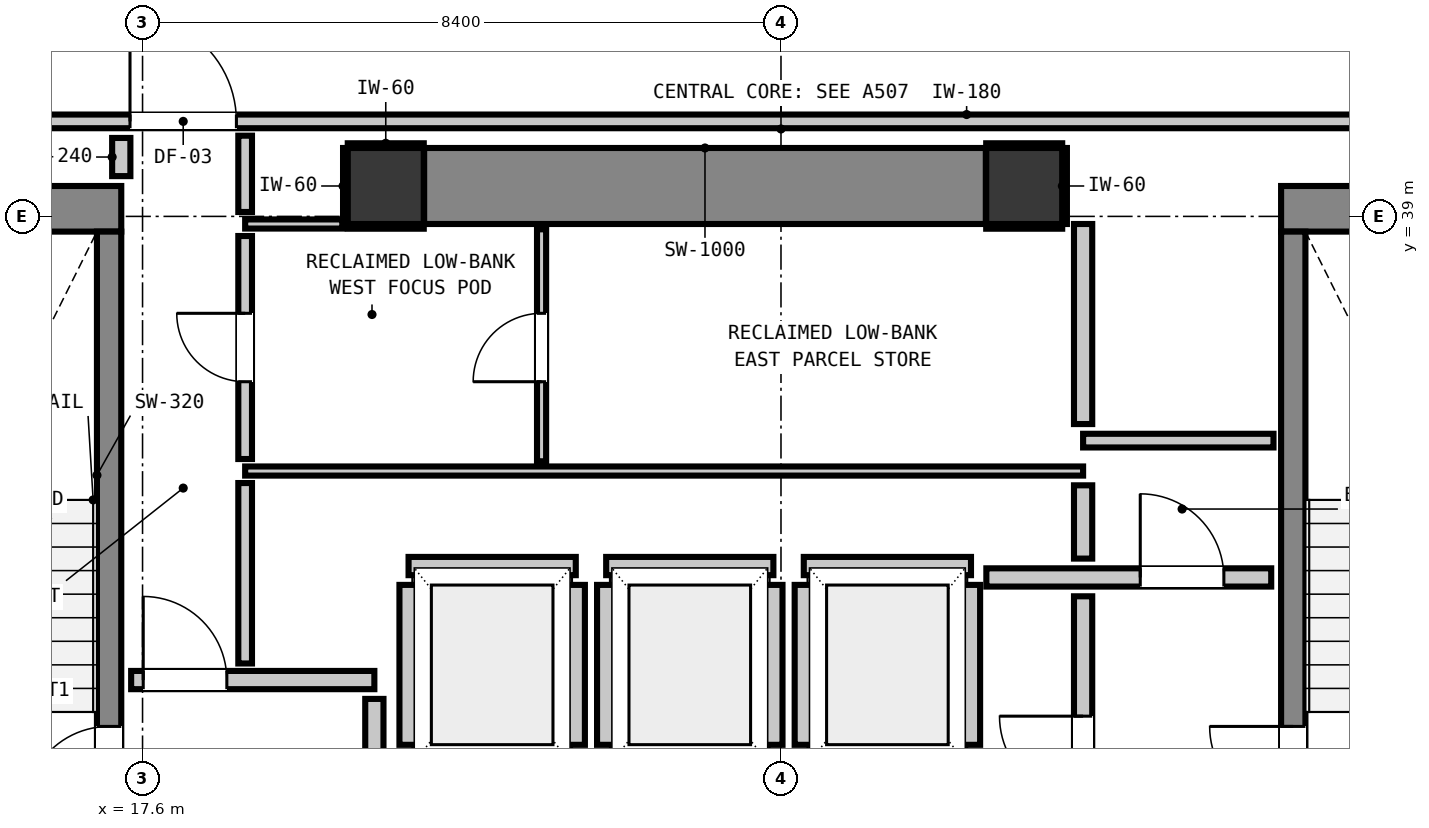
"""IFC4 building model, lengths in metres.
Left out: names, types, materials, properties, quantities, classifications, styles, units other than length and angle.
Written with IfcOpenShell. Run it as: python <this file> out.ifc"""

import sys

from ifc_helpers import new_model, si_unit, direction, frame, frame_2d, origin, origin_2d, place, context, subcontext, project, spatial, rectangle, extrude, element, fill, save


model = new_model("IFC4")
c1 = context("Model", 3, precision=1e-05, world=origin(), true_north=direction((0.0, 1.0)))
c2 = subcontext(c1, "Body", "Model", "MODEL_VIEW")
j1 = project(units=[si_unit("LENGTHUNIT", "METRE"), si_unit("PLANEANGLEUNIT", "RADIAN")], contexts=[c1])
p1 = place(None, origin())
s1 = spatial("IfcSite", under=j1, at=p1, CompositionType="ELEMENT")
p2 = place(p1, origin())
s2 = spatial("IfcBuilding", under=s1, at=p2, CompositionType="ELEMENT")
p3 = place(p2, frame((0.0, 0.0, 169.16)))
s3 = spatial("IfcBuildingStorey", under=s2, at=p3, CompositionType="ELEMENT", Elevation=169.16)
for number, where, z_axis, x_axis in (
    (1, (20.8, 39.4, 0.0), (0.0, 0.0, 1.0), (1.0, 0.0, 0.0)),
    (2, (29.2, 39.4, 0.0), (0.0, 0.0, 1.0), (1.0, 0.0, 0.0)),
):
    element("IfcColumn", number, at=place(p3, frame(where, z_axis=z_axis, x_axis=x_axis)), inside=s3, PredefinedType="COLUMN", context=c2, shape_type="SweptSolid", body=[
        extrude(rectangle(XDim=1.0, YDim=1.0, at=origin_2d()), origin(), (0.0, 0.0, 1.0), 3.32),
    ])
p4 = place(p3, frame((13.24, 39.1, 0.0), z_axis=(0.0, 0.0, 1.0), x_axis=(1.0, 0.0, 0.0)))
e3 = element("IfcWall", 3, at=p4, inside=s3, PredefinedType="SHEAR", context=c2, shape_type="SweptSolid", body=[
    extrude(rectangle(XDim=4.08, YDim=0.6, at=frame_2d((2.04, 0.0))), origin(), (0.0, 0.0, 1.0), 3.32),
])
p5 = place(p3, frame((32.58, 39.1, 0.0), z_axis=(0.0, 0.0, 1.0), x_axis=(1.0, 0.0, 0.0)))
e4 = element("IfcWall", 4, at=p5, inside=s3, PredefinedType="SHEAR", context=c2, shape_type="SweptSolid", body=[
    extrude(rectangle(XDim=4.08, YDim=0.6, at=frame_2d((2.04, 0.0))), origin(), (0.0, 0.0, 1.0), 3.32),
])
p6 = place(p3, frame((21.305, 39.4, 0.0), z_axis=(0.0, 0.0, 1.0), x_axis=(1.0, 0.0, 0.0)))
e5 = element("IfcWall", 5, at=p6, inside=s3, PredefinedType="SHEAR", context=c2, shape_type="SweptSolid", body=[
    extrude(rectangle(XDim=7.39, YDim=1.0, at=frame_2d((3.695, 0.0))), origin(), (0.0, 0.0, 1.0), 3.32),
])
p7 = place(p3, frame((17.16, 31.0, 0.0), z_axis=(0.0, 0.0, 1.0), x_axis=(0.0, 1.0, 0.0)))
e6 = element("IfcWall", 6, at=p7, inside=s3, PredefinedType="SHEAR", context=c2, shape_type="SweptSolid", body=[
    extrude(rectangle(XDim=7.8, YDim=0.32, at=frame_2d((3.9, 0.0))), origin(), (0.0, 0.0, 1.0), 3.32),
])
p8 = place(p7, frame((0.19, 0.0, 0.0)))
e7 = element("IfcOpeningElement", 7, at=p8, cuts=e6, PredefinedType="OPENING", context=c2, shape_type="SweptSolid", body=[
    extrude(rectangle(XDim=1.1, YDim=2.15, at=frame_2d((0.55, 1.075))), frame((0.0, 0.17, 0.0), z_axis=(0.0, -1.0, 0.0), x_axis=(1.0, 0.0, 0.0)), (0.0, 0.0, 1.0), 0.34),
])
p9 = place(p3, frame((32.74, 31.0, 0.0), z_axis=(0.0, 0.0, 1.0), x_axis=(0.0, 1.0, 0.0)))
e8 = element("IfcWall", 8, at=p9, inside=s3, PredefinedType="SHEAR", context=c2, shape_type="SweptSolid", body=[
    extrude(rectangle(XDim=7.8, YDim=0.32, at=frame_2d((3.9, 0.0))), origin(), (0.0, 0.0, 1.0), 3.32),
])
p10 = place(p9, frame((0.19, 0.0, 0.0)))
e9 = element("IfcOpeningElement", 9, at=p10, cuts=e8, PredefinedType="OPENING", context=c2, shape_type="SweptSolid", body=[
    extrude(rectangle(XDim=1.1, YDim=2.15, at=frame_2d((0.55, 1.075))), frame((0.0, 0.17, 0.0), z_axis=(0.0, -1.0, 0.0), x_axis=(1.0, 0.0, 0.0)), (0.0, 0.0, 1.0), 0.34),
])
p11 = place(p3, frame((21.1, 34.4, 0.0), z_axis=(0.0, 0.0, 1.0), x_axis=(1.0, 0.0, 0.0)))
e10 = element("IfcWall", 10, at=p11, inside=s3, PredefinedType="PARTITIONING", context=c2, shape_type="SweptSolid", body=[
    extrude(rectangle(XDim=2.2, YDim=0.24, at=frame_2d((1.1, 0.0))), origin(), (0.0, 0.0, 1.0), 2.96),
])
p12 = place(p3, frame((21.1, 32.048, 0.0), z_axis=(0.0, 0.0, 1.0), x_axis=(0.0, 1.0, 0.0)))
e11 = element("IfcWall", 11, at=p12, inside=s3, PredefinedType="PARTITIONING", context=c2, shape_type="SweptSolid", body=[
    extrude(rectangle(XDim=2.104, YDim=0.24, at=frame_2d((1.052, 0.0))), origin(), (0.0, 0.0, 1.0), 2.195),
])
p13 = place(p3, frame((23.3, 32.048, 0.0), z_axis=(0.0, 0.0, 1.0), x_axis=(0.0, 1.0, 0.0)))
e12 = element("IfcWall", 12, at=p13, inside=s3, PredefinedType="PARTITIONING", context=c2, shape_type="SweptSolid", body=[
    extrude(rectangle(XDim=2.104, YDim=0.24, at=frame_2d((1.052, 0.0))), origin(), (0.0, 0.0, 1.0), 2.96),
])
p14 = place(p3, frame((23.7, 34.4, 0.0), z_axis=(0.0, 0.0, 1.0), x_axis=(1.0, 0.0, 0.0)))
e13 = element("IfcWall", 13, at=p14, inside=s3, PredefinedType="PARTITIONING", context=c2, shape_type="SweptSolid", body=[
    extrude(rectangle(XDim=2.2, YDim=0.24, at=frame_2d((1.1, 0.0))), origin(), (0.0, 0.0, 1.0), 2.96),
])
for number, where, z_axis, x_axis in (
    (14, (23.7, 32.048, 0.0), (0.0, 0.0, 1.0), (0.0, 1.0, 0.0)),
    (15, (25.9, 32.048, 0.0), (0.0, 0.0, 1.0), (0.0, 1.0, 0.0)),
):
    element("IfcWall", number, at=place(p3, frame(where, z_axis=z_axis, x_axis=x_axis)), inside=s3, PredefinedType="PARTITIONING", context=c2, shape_type="SweptSolid", body=[
        extrude(rectangle(XDim=2.104, YDim=0.24, at=frame_2d((1.052, 0.0))), origin(), (0.0, 0.0, 1.0), 2.96),
    ])
p15 = place(p3, frame((26.3, 34.4, 0.0), z_axis=(0.0, 0.0, 1.0), x_axis=(1.0, 0.0, 0.0)))
e16 = element("IfcWall", 16, at=p15, inside=s3, PredefinedType="PARTITIONING", context=c2, shape_type="SweptSolid", body=[
    extrude(rectangle(XDim=2.2, YDim=0.24, at=frame_2d((1.1, 0.0))), origin(), (0.0, 0.0, 1.0), 2.96),
])
for number, where, z_axis, x_axis in (
    (17, (26.3, 32.048, 0.0), (0.0, 0.0, 1.0), (0.0, 1.0, 0.0)),
    (18, (28.5, 32.048, 0.0), (0.0, 0.0, 1.0), (0.0, 1.0, 0.0)),
):
    element("IfcWall", number, at=place(p3, frame(where, z_axis=z_axis, x_axis=x_axis)), inside=s3, PredefinedType="PARTITIONING", context=c2, shape_type="SweptSolid", body=[
        extrude(rectangle(XDim=2.104, YDim=0.24, at=frame_2d((1.052, 0.0))), origin(), (0.0, 0.0, 1.0), 2.96),
    ])
p16 = place(p3, frame((17.45, 32.9, 0.0), z_axis=(0.0, 0.0, 1.0), x_axis=(1.0, 0.0, 0.0)))
e19 = element("IfcWall", 19, at=p16, inside=s3, PredefinedType="PARTITIONING", context=c2, shape_type="SweptSolid", body=[
    extrude(rectangle(XDim=3.2, YDim=0.24, at=frame_2d((1.6, 0.0))), origin(), (0.0, 0.0, 1.0), 2.96),
])
p17 = place(p16, frame((0.159, 0.0, 0.0)))
e20 = element("IfcOpeningElement", 20, at=p17, cuts=e19, PredefinedType="OPENING", context=c2, shape_type="SweptSolid", body=[
    extrude(rectangle(XDim=1.1, YDim=2.15, at=frame_2d((0.55, 1.075))), frame((0.0, 0.13, 0.0), z_axis=(0.0, -1.0, 0.0), x_axis=(1.0, 0.0, 0.0)), (0.0, 0.0, 1.0), 0.26),
])
p18 = place(p3, frame((28.702, 34.25, 0.0), z_axis=(0.0, 0.0, 1.0), x_axis=(1.0, 0.0, 0.0)))
e21 = element("IfcWall", 21, at=p18, inside=s3, PredefinedType="PARTITIONING", context=c2, shape_type="SweptSolid", body=[
    extrude(rectangle(XDim=3.748, YDim=0.24, at=frame_2d((1.874, 0.0))), origin(), (0.0, 0.0, 1.0), 2.96),
])
p19 = place(p18, frame((2.025, 0.0, 0.0)))
e22 = element("IfcOpeningElement", 22, at=p19, cuts=e21, PredefinedType="OPENING", context=c2, shape_type="SweptSolid", body=[
    extrude(rectangle(XDim=1.1, YDim=2.15, at=frame_2d((0.55, 1.075))), frame((0.0, 0.13, 0.0), z_axis=(0.0, -1.0, 0.0), x_axis=(1.0, 0.0, 0.0)), (0.0, 0.0, 1.0), 0.26),
])
p20 = place(p3, frame((29.975, 36.05, 0.0), z_axis=(0.0, 0.0, 1.0), x_axis=(1.0, 0.0, 0.0)))
e23 = element("IfcWall", 23, at=p20, inside=s3, PredefinedType="PARTITIONING", context=c2, shape_type="SweptSolid", body=[
    extrude(rectangle(XDim=2.505, YDim=0.18, at=frame_2d((1.252, 0.0))), origin(), (0.0, 0.0, 1.0), 2.96),
])
p21 = place(p3, frame((3.207, 40.25, 0.0), z_axis=(0.0, 0.0, 1.0), x_axis=(1.0, 0.0, 0.0)))
e24 = element("IfcWall", 24, at=p21, inside=s3, PredefinedType="PARTITIONING", context=c2, shape_type="SweptSolid", body=[
    extrude(rectangle(XDim=39.386, YDim=0.18, at=frame_2d((19.693, 0.0))), origin(), (0.0, 0.0, 1.0), 2.96),
])
p22 = place(p21, frame((14.228, 0.0, 0.0)))
e25 = element("IfcOpeningElement", 25, at=p22, cuts=e24, PredefinedType="OPENING", context=c2, shape_type="SweptSolid", body=[
    extrude(rectangle(XDim=1.4, YDim=2.15, at=frame_2d((0.7, 1.075))), frame((0.0, 0.1, 0.0), z_axis=(0.0, -1.0, 0.0), x_axis=(1.0, 0.0, 0.0)), (0.0, 0.0, 1.0), 0.2),
])
p23 = place(p21, frame((7.243, 0.0, 0.0)))
e26 = element("IfcOpeningElement", 26, at=p23, cuts=e24, PredefinedType="OPENING", context=c2, shape_type="SweptSolid", body=[
    extrude(rectangle(XDim=1.4, YDim=2.15, at=frame_2d((0.7, 1.075))), frame((0.0, 0.1, 0.0), z_axis=(0.0, -1.0, 0.0), x_axis=(1.0, 0.0, 0.0)), (0.0, 0.0, 1.0), 0.2),
])
p24 = place(p21, frame((34.843, 0.0, 0.0)))
e27 = element("IfcOpeningElement", 27, at=p24, cuts=e24, PredefinedType="OPENING", context=c2, shape_type="SweptSolid", body=[
    extrude(rectangle(XDim=1.4, YDim=2.15, at=frame_2d((0.7, 1.075))), frame((0.0, 0.1, 0.0), z_axis=(0.0, -1.0, 0.0), x_axis=(1.0, 0.0, 0.0)), (0.0, 0.0, 1.0), 0.2),
])
p25 = place(p3, frame((18.95, 35.65, 0.0), z_axis=(0.0, 0.0, 1.0), x_axis=(1.0, 0.0, 0.0)))
e28 = element("IfcWall", 28, at=p25, inside=s3, PredefinedType="PARTITIONING", context=c2, shape_type="SweptSolid", body=[
    extrude(rectangle(XDim=11.025, YDim=0.12, at=frame_2d((5.513, 0.0))), origin(), (0.0, 0.0, 1.0), 2.96),
])
p26 = place(p3, frame((18.95, 38.9, 0.0), z_axis=(0.0, 0.0, 1.0), x_axis=(1.0, 0.0, 0.0)))
e29 = element("IfcWall", 29, at=p26, inside=s3, PredefinedType="PARTITIONING", context=c2, shape_type="SweptSolid", body=[
    extrude(rectangle(XDim=1.278, YDim=0.12, at=frame_2d((0.639, 0.0))), origin(), (0.0, 0.0, 1.0), 2.96),
])
p27 = place(p3, frame((17.32, 39.53, 0.0), z_axis=(0.0, 0.0, 1.0), x_axis=(0.0, 1.0, 0.0)))
e30 = element("IfcWall", 30, at=p27, inside=s3, PredefinedType="PARTITIONING", context=c2, shape_type="SweptSolid", body=[
    extrude(rectangle(XDim=0.502, YDim=0.24, at=frame_2d((0.251, 0.0))), origin(), (0.0, 0.0, 1.0), 2.96),
])
p28 = place(p3, frame((20.65, 31.868, 0.0), z_axis=(0.0, 0.0, 1.0), x_axis=(0.0, 1.0, 0.0)))
e31 = element("IfcWall", 31, at=p28, inside=s3, PredefinedType="PARTITIONING", context=c2, shape_type="SweptSolid", body=[
    extrude(rectangle(XDim=0.784, YDim=0.24, at=frame_2d((0.392, 0.0))), origin(), (0.0, 0.0, 1.0), 2.195),
])
p29 = place(p3, frame((29.975, 29.768, 0.0), z_axis=(0.0, 0.0, 1.0), x_axis=(0.0, 1.0, 0.0)))
e32 = element("IfcWall", 32, at=p29, inside=s3, PredefinedType="PARTITIONING", context=c2, shape_type="SweptSolid", body=[
    extrude(rectangle(XDim=4.234, YDim=0.24, at=frame_2d((2.117, 0.0))), origin(), (0.0, 0.0, 1.0), 2.96),
])
p30 = place(p29, frame((1.557, 0.0, 0.0)))
e33 = element("IfcOpeningElement", 33, at=p30, cuts=e32, PredefinedType="OPENING", context=c2, shape_type="SweptSolid", body=[
    extrude(rectangle(XDim=1.1, YDim=2.15, at=frame_2d((0.55, 1.075))), frame((0.0, 0.13, 0.0), z_axis=(0.0, -1.0, 0.0), x_axis=(1.0, 0.0, 0.0)), (0.0, 0.0, 1.0), 0.26),
])
p31 = place(p3, frame((29.975, 34.498, 0.0), z_axis=(0.0, 0.0, 1.0), x_axis=(0.0, 1.0, 0.0)))
e34 = element("IfcWall", 34, at=p31, inside=s3, PredefinedType="PARTITIONING", context=c2, shape_type="SweptSolid", body=[
    extrude(rectangle(XDim=0.964, YDim=0.24, at=frame_2d((0.482, 0.0))), origin(), (0.0, 0.0, 1.0), 2.96),
])
p32 = place(p3, frame((29.975, 36.268, 0.0), z_axis=(0.0, 0.0, 1.0), x_axis=(0.0, 1.0, 0.0)))
e35 = element("IfcWall", 35, at=p32, inside=s3, PredefinedType="PARTITIONING", context=c2, shape_type="SweptSolid", body=[
    extrude(rectangle(XDim=2.632, YDim=0.24, at=frame_2d((1.316, 0.0))), origin(), (0.0, 0.0, 1.0), 2.96),
])
p33 = place(p3, frame((18.95, 33.118, 0.0), z_axis=(0.0, 0.0, 1.0), x_axis=(0.0, 1.0, 0.0)))
e36 = element("IfcWall", 36, at=p33, inside=s3, PredefinedType="PARTITIONING", context=c2, shape_type="SweptSolid", body=[
    extrude(rectangle(XDim=2.374, YDim=0.18, at=frame_2d((1.187, 0.0))), origin(), (0.0, 0.0, 1.0), 2.96),
])
p34 = place(p3, frame((18.95, 35.808, 0.0), z_axis=(0.0, 0.0, 1.0), x_axis=(0.0, 1.0, 0.0)))
e37 = element("IfcWall", 37, at=p34, inside=s3, PredefinedType="PARTITIONING", context=c2, shape_type="SweptSolid", body=[
    extrude(rectangle(XDim=2.934, YDim=0.18, at=frame_2d((1.467, 0.0))), origin(), (0.0, 0.0, 1.0), 2.96),
])
p35 = place(p34, frame((1.017, 0.0, 0.0)))
e38 = element("IfcOpeningElement", 38, at=p35, cuts=e37, PredefinedType="OPENING", context=c2, shape_type="SweptSolid", body=[
    extrude(rectangle(XDim=0.9, YDim=2.1, at=frame_2d((0.45, 1.05))), frame((0.0, 0.1, 0.0), z_axis=(0.0, -1.0, 0.0), x_axis=(1.0, 0.0, 0.0)), (0.0, 0.0, 1.0), 0.2),
])
p36 = place(p3, frame((18.95, 39.058, 0.0), z_axis=(0.0, 0.0, 1.0), x_axis=(0.0, 1.0, 0.0)))
e39 = element("IfcWall", 39, at=p36, inside=s3, PredefinedType="PARTITIONING", context=c2, shape_type="SweptSolid", body=[
    extrude(rectangle(XDim=1.004, YDim=0.18, at=frame_2d((0.502, 0.0))), origin(), (0.0, 0.0, 1.0), 2.96),
])
p37 = place(p3, frame((22.85, 35.778, 0.0), z_axis=(0.0, 0.0, 1.0), x_axis=(0.0, 1.0, 0.0)))
e40 = element("IfcWall", 40, at=p37, inside=s3, PredefinedType="PARTITIONING", context=c2, shape_type="SweptSolid", body=[
    extrude(rectangle(XDim=3.052, YDim=0.12, at=frame_2d((1.526, 0.0))), origin(), (0.0, 0.0, 1.0), 2.96),
])
p38 = place(p37, frame((1.047, 0.0, 0.0)))
e41 = element("IfcOpeningElement", 41, at=p38, cuts=e40, PredefinedType="OPENING", context=c2, shape_type="SweptSolid", body=[
    extrude(rectangle(XDim=0.9, YDim=2.1, at=frame_2d((0.45, 1.05))), frame((0.0, 0.07, 0.0), z_axis=(0.0, -1.0, 0.0), x_axis=(1.0, 0.0, 0.0)), (0.0, 0.0, 1.0), 0.14),
])
for number, where, z_axis, x_axis in (
    (42, (20.3, 38.868, 0.0), (0.0, 0.0, 1.0), (1.0, 0.0, 0.0)),
    (43, (20.3, 39.932, 0.0), (0.0, 0.0, 1.0), (1.0, 0.0, 0.0)),
    (44, (20.268, 38.9, 0.0), (0.0, 0.0, 1.0), (0.0, 1.0, 0.0)),
    (45, (28.7, 38.868, 0.0), (0.0, 0.0, 1.0), (1.0, 0.0, 0.0)),
    (46, (28.7, 39.932, 0.0), (0.0, 0.0, 1.0), (1.0, 0.0, 0.0)),
    (47, (29.732, 38.9, 0.0), (0.0, 0.0, 1.0), (0.0, 1.0, 0.0)),
):
    element("IfcWall", number, at=place(p3, frame(where, z_axis=z_axis, x_axis=x_axis)), inside=s3, PredefinedType="PARTITIONING", context=c2, shape_type="SweptSolid", body=[
        extrude(rectangle(XDim=1.0, YDim=0.06, at=frame_2d((0.5, 0.0))), origin(), (0.0, 0.0, 1.0), 1.45),
    ])
p39 = place(p8, origin())
e48 = element("IfcDoor", 48, at=p39, inside=s3, OperationType="SINGLE_SWING_LEFT", PredefinedType="DOOR", context=c2, shape_type="SweptSolid", body=[
    extrude(rectangle(XDim=1.1, YDim=2.15, at=frame_2d((0.55, 1.075))), frame((0.0, 0.025, 0.0), z_axis=(0.0, -1.0, 0.0), x_axis=(1.0, 0.0, 0.0)), (0.0, 0.0, 1.0), 0.05),
])
fill(e7, e48)
p40 = place(p10, origin())
e49 = element("IfcDoor", 49, at=p40, inside=s3, OperationType="SINGLE_SWING_RIGHT", PredefinedType="DOOR", context=c2, shape_type="SweptSolid", body=[
    extrude(rectangle(XDim=1.1, YDim=2.15, at=frame_2d((0.55, 1.075))), frame((0.0, 0.025, 0.0), z_axis=(0.0, -1.0, 0.0), x_axis=(1.0, 0.0, 0.0)), (0.0, 0.0, 1.0), 0.05),
])
fill(e9, e49)
p41 = place(p17, origin())
e50 = element("IfcDoor", 50, at=p41, inside=s3, OperationType="SINGLE_SWING_LEFT", PredefinedType="DOOR", context=c2, shape_type="SweptSolid", body=[
    extrude(rectangle(XDim=1.1, YDim=2.15, at=frame_2d((0.55, 1.075))), frame((0.0, 0.025, 0.0), z_axis=(0.0, -1.0, 0.0), x_axis=(1.0, 0.0, 0.0)), (0.0, 0.0, 1.0), 0.05),
])
fill(e20, e50)
p42 = place(p30, origin())
e51 = element("IfcDoor", 51, at=p42, inside=s3, OperationType="SINGLE_SWING_RIGHT", PredefinedType="DOOR", context=c2, shape_type="SweptSolid", body=[
    extrude(rectangle(XDim=1.1, YDim=2.15, at=frame_2d((0.55, 1.075))), frame((0.0, 0.025, 0.0), z_axis=(0.0, -1.0, 0.0), x_axis=(1.0, 0.0, 0.0)), (0.0, 0.0, 1.0), 0.05),
])
fill(e33, e51)
p43 = place(p19, origin())
e52 = element("IfcDoor", 52, at=p43, inside=s3, OperationType="SINGLE_SWING_LEFT", PredefinedType="DOOR", context=c2, shape_type="SweptSolid", body=[
    extrude(rectangle(XDim=1.1, YDim=2.15, at=frame_2d((0.55, 1.075))), frame((0.0, 0.025, 0.0), z_axis=(0.0, -1.0, 0.0), x_axis=(1.0, 0.0, 0.0)), (0.0, 0.0, 1.0), 0.05),
])
fill(e22, e52)
p44 = place(p22, origin())
e53 = element("IfcDoor", 53, at=p44, inside=s3, OperationType="SINGLE_SWING_LEFT", PredefinedType="DOOR", context=c2, shape_type="SweptSolid", body=[
    extrude(rectangle(XDim=1.4, YDim=2.15, at=frame_2d((0.7, 1.075))), frame((0.0, 0.025, 0.0), z_axis=(0.0, -1.0, 0.0), x_axis=(1.0, 0.0, 0.0)), (0.0, 0.0, 1.0), 0.05),
])
fill(e25, e53)
p45 = place(p35, origin())
e54 = element("IfcDoor", 54, at=p45, inside=s3, OperationType="SINGLE_SWING_RIGHT", PredefinedType="DOOR", context=c2, shape_type="SweptSolid", body=[
    extrude(rectangle(XDim=0.9, YDim=2.1, at=frame_2d((0.45, 1.05))), frame((0.0, 0.025, 0.0), z_axis=(0.0, -1.0, 0.0), x_axis=(1.0, 0.0, 0.0)), (0.0, 0.0, 1.0), 0.05),
])
fill(e38, e54)
p46 = place(p38, origin())
e55 = element("IfcDoor", 55, at=p46, inside=s3, OperationType="SINGLE_SWING_LEFT", PredefinedType="DOOR", context=c2, shape_type="SweptSolid", body=[
    extrude(rectangle(XDim=0.9, YDim=2.1, at=frame_2d((0.45, 1.05))), frame((0.0, 0.025, 0.0), z_axis=(0.0, -1.0, 0.0), x_axis=(1.0, 0.0, 0.0)), (0.0, 0.0, 1.0), 0.05),
])
fill(e41, e55)
save(model, sys.argv[1])
